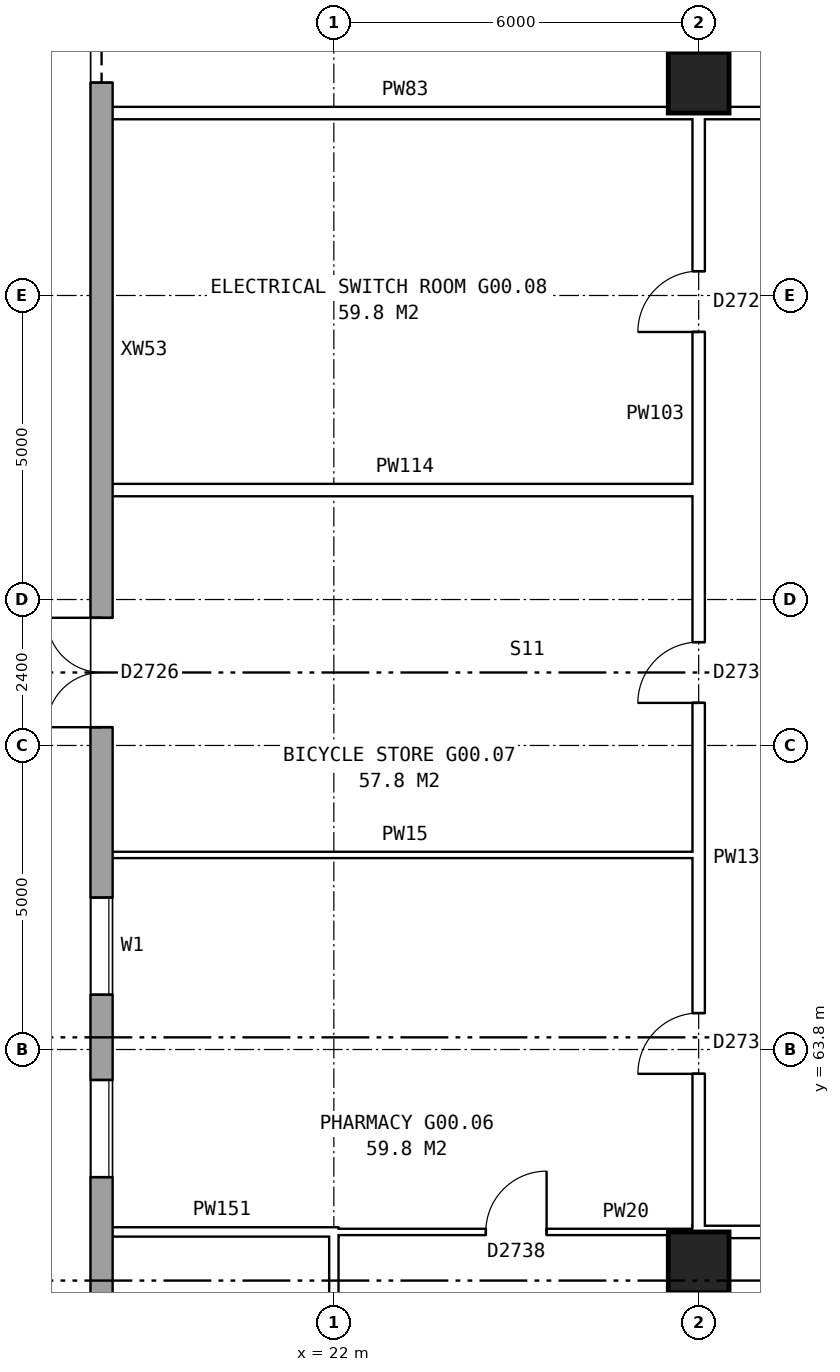
"""IFC4 building model, lengths in metres.
Left out: names, types, materials, properties, quantities, classifications, styles, units other than length and angle.
Written with IfcOpenShell. Run it as: python <this file> out.ifc"""

import sys

from ifc_helpers import new_model, si_unit, direction, frame, frame_2d, origin, origin_2d, place, context, subcontext, project, spatial, rectangle, extrude, element, fill, save


model = new_model("IFC4")
c1 = context("Model", 3, precision=1e-05, world=origin(), true_north=direction((0.0, 1.0)))
c2 = subcontext(c1, "Body", "Model", "MODEL_VIEW")
j1 = project(units=[si_unit("LENGTHUNIT", "METRE"), si_unit("PLANEANGLEUNIT", "RADIAN")], contexts=[c1])
p1 = place(None, origin())
s1 = spatial("IfcSite", under=j1, at=p1, CompositionType="ELEMENT")
p2 = place(p1, origin())
s2 = spatial("IfcBuilding", under=s1, at=p2, CompositionType="ELEMENT")
p3 = place(p2, origin())
s3 = spatial("IfcBuildingStorey", under=s2, at=p3, CompositionType="ELEMENT", Elevation=0.0)
for number, where, z_axis, x_axis in (
    (1, (28.0, 60.3, -0.35), (0.0, 0.0, 1.0), (1.0, 0.0, 0.0)),
    (2, (28.0, 79.7, -0.35), (0.0, 0.0, 1.0), (1.0, 0.0, 0.0)),
):
    element("IfcColumn", number, at=place(p3, frame(where, z_axis=z_axis, x_axis=x_axis)), inside=s3, PredefinedType="COLUMN", context=c2, shape_type="SweptSolid", body=[
        extrude(rectangle(XDim=1.0, YDim=1.0, at=origin_2d()), origin(), (0.0, 0.0, 1.0), 5.55),
    ])
p4 = place(p3, frame((18.18, 82.925, 0.0), z_axis=(0.0, 0.0, 1.0), x_axis=(0.0, -1.0, 0.0)))
e3 = element("IfcWall", 3, at=p4, inside=s3, PredefinedType="STANDARD", context=c2, shape_type="SweptSolid", body=[
    extrude(rectangle(XDim=25.851, YDim=0.36, at=frame_2d((12.925, 0.0))), origin(), (0.0, 0.0, 1.0), 5.2),
])
p5 = place(p4, frame((16.625, 0.0, 0.8)))
e4 = element("IfcOpeningElement", 4, at=p5, cuts=e3, PredefinedType="OPENING", context=c2, shape_type="SweptSolid", body=[
    extrude(rectangle(XDim=1.6, YDim=1.8, at=frame_2d((0.8, 0.9))), frame((0.0, 0.19, 0.0), z_axis=(0.0, -1.0, 0.0), x_axis=(1.0, 0.0, 0.0)), (0.0, 0.0, 1.0), 0.38),
])
p6 = place(p4, frame((19.625, 0.0, 0.8)))
e5 = element("IfcOpeningElement", 5, at=p6, cuts=e3, PredefinedType="OPENING", context=c2, shape_type="SweptSolid", body=[
    extrude(rectangle(XDim=1.6, YDim=1.8, at=frame_2d((0.8, 0.9))), frame((0.0, 0.19, 0.0), z_axis=(0.0, -1.0, 0.0), x_axis=(1.0, 0.0, 0.0)), (0.0, 0.0, 1.0), 0.38),
])
p7 = place(p4, frame((0.225, 0.0, 0.0)))
e6 = element("IfcOpeningElement", 6, at=p7, cuts=e3, PredefinedType="OPENING", context=c2, shape_type="SweptSolid", body=[
    extrude(rectangle(XDim=3.0, YDim=4.4, at=frame_2d((1.5, 2.2))), frame((0.0, 0.19, 0.0), z_axis=(0.0, -1.0, 0.0), x_axis=(1.0, 0.0, 0.0)), (0.0, 0.0, 1.0), 0.38),
])
p8 = place(p4, frame((12.025, 0.0, 0.0)))
e7 = element("IfcOpeningElement", 7, at=p8, cuts=e3, PredefinedType="OPENING", context=c2, shape_type="SweptSolid", body=[
    extrude(rectangle(XDim=1.8, YDim=2.4, at=frame_2d((0.9, 1.2))), frame((0.0, 0.19, 0.0), z_axis=(0.0, -1.0, 0.0), x_axis=(1.0, 0.0, 0.0)), (0.0, 0.0, 1.0), 0.38),
])
p9 = place(p3, frame((27.898, 60.8, 0.0), z_axis=(0.0, 0.0, 1.0), x_axis=(1.0, 0.0, 0.0)))
e8 = element("IfcWall", 8, at=p9, inside=s3, PredefinedType="PARTITIONING", context=c2, shape_type="SweptSolid", body=[
    extrude(rectangle(XDim=16.122, YDim=0.2, at=frame_2d((8.061, 0.0))), origin(), (0.0, 0.0, 1.0), 5.2),
])
p10 = place(p9, frame((2.201, 0.0, 0.0)))
e9 = element("IfcOpeningElement", 9, at=p10, cuts=e8, PredefinedType="OPENING", context=c2, shape_type="SweptSolid", body=[
    extrude(rectangle(XDim=1.8, YDim=2.1, at=frame_2d((0.9, 1.05))), frame((0.0, 0.11, 0.0), z_axis=(0.0, -1.0, 0.0), x_axis=(1.0, 0.0, 0.0)), (0.0, 0.0, 1.0), 0.22),
])
p11 = place(p3, frame((21.923, 60.8, 0.0), z_axis=(0.0, 0.0, 1.0), x_axis=(1.0, 0.0, 0.0)))
e10 = element("IfcWall", 10, at=p11, inside=s3, PredefinedType="PARTITIONING", context=c2, shape_type="SweptSolid", body=[
    extrude(rectangle(XDim=6.177, YDim=0.1, at=frame_2d((3.088, 0.0))), origin(), (0.0, 0.0, 1.0), 5.2),
])
p12 = place(p11, frame((2.576, 0.0, 0.0)))
e11 = element("IfcOpeningElement", 11, at=p12, cuts=e10, PredefinedType="OPENING", context=c2, shape_type="SweptSolid", body=[
    extrude(rectangle(XDim=1.0, YDim=2.1, at=frame_2d((0.5, 1.05))), frame((0.0, 0.06, 0.0), z_axis=(0.0, -1.0, 0.0), x_axis=(1.0, 0.0, 0.0)), (0.0, 0.0, 1.0), 0.12),
])
p13 = place(p3, frame((18.24, 60.8, 0.0), z_axis=(0.0, 0.0, 1.0), x_axis=(1.0, 0.0, 0.0)))
e12 = element("IfcWall", 12, at=p13, inside=s3, PredefinedType="PLUMBINGWALL", context=c2, shape_type="SweptSolid", body=[
    extrude(rectangle(XDim=3.837, YDim=0.15, at=frame_2d((1.918, 0.0))), origin(), (0.0, 0.0, 1.0), 5.2),
])
p14 = place(p3, frame((18.24, 67.0, 0.0), z_axis=(0.0, 0.0, 1.0), x_axis=(1.0, 0.0, 0.0)))
e13 = element("IfcWall", 13, at=p14, inside=s3, PredefinedType="PARTITIONING", context=c2, shape_type="SweptSolid", body=[
    extrude(rectangle(XDim=9.86, YDim=0.1, at=frame_2d((4.93, 0.0))), origin(), (0.0, 0.0, 1.0), 5.2),
])
p15 = place(p3, frame((18.24, 73.0, 0.0), z_axis=(0.0, 0.0, 1.0), x_axis=(1.0, 0.0, 0.0)))
e14 = element("IfcWall", 14, at=p15, inside=s3, PredefinedType="PARTITIONING", context=c2, shape_type="SweptSolid", body=[
    extrude(rectangle(XDim=9.86, YDim=0.2, at=frame_2d((4.93, 0.0))), origin(), (0.0, 0.0, 1.0), 5.2),
])
p16 = place(p3, frame((18.24, 79.2, 0.0), z_axis=(0.0, 0.0, 1.0), x_axis=(1.0, 0.0, 0.0)))
e15 = element("IfcWall", 15, at=p16, inside=s3, PredefinedType="PARTITIONING", context=c2, shape_type="SweptSolid", body=[
    extrude(rectangle(XDim=9.862, YDim=0.2, at=frame_2d((4.931, 0.0))), origin(), (0.0, 0.0, 1.0), 5.2),
])
p17 = place(p3, frame((27.898, 79.2, 0.0), z_axis=(0.0, 0.0, 1.0), x_axis=(1.0, 0.0, 0.0)))
e16 = element("IfcWall", 16, at=p17, inside=s3, PredefinedType="PARTITIONING", context=c2, shape_type="SweptSolid", body=[
    extrude(rectangle(XDim=16.122, YDim=0.2, at=frame_2d((8.061, 0.0))), origin(), (0.0, 0.0, 1.0), 5.2),
])
p18 = place(p17, frame((3.701, 0.0, 0.0)))
e17 = element("IfcOpeningElement", 17, at=p18, cuts=e16, PredefinedType="OPENING", context=c2, shape_type="SweptSolid", body=[
    extrude(rectangle(XDim=1.8, YDim=2.1, at=frame_2d((0.9, 1.05))), frame((0.0, 0.11, 0.0), z_axis=(0.0, -1.0, 0.0), x_axis=(1.0, 0.0, 0.0)), (0.0, 0.0, 1.0), 0.22),
])
p19 = place(p17, frame((10.102, 0.0, 0.0)))
e18 = element("IfcOpeningElement", 18, at=p19, cuts=e16, PredefinedType="OPENING", context=c2, shape_type="SweptSolid", body=[
    extrude(rectangle(XDim=1.0, YDim=2.1, at=frame_2d((0.5, 1.05))), frame((0.0, 0.11, 0.0), z_axis=(0.0, -1.0, 0.0), x_axis=(1.0, 0.0, 0.0)), (0.0, 0.0, 1.0), 0.22),
])
p20 = place(p17, frame((13.552, 0.0, 0.0)))
e19 = element("IfcOpeningElement", 19, at=p20, cuts=e16, PredefinedType="OPENING", context=c2, shape_type="SweptSolid", body=[
    extrude(rectangle(XDim=1.0, YDim=2.1, at=frame_2d((0.5, 1.05))), frame((0.0, 0.11, 0.0), z_axis=(0.0, -1.0, 0.0), x_axis=(1.0, 0.0, 0.0)), (0.0, 0.0, 1.0), 0.22),
])
p21 = place(p3, frame((22.0, 54.24, 0.0), z_axis=(0.0, 0.0, 1.0), x_axis=(0.0, 1.0, 0.0)))
e20 = element("IfcWall", 20, at=p21, inside=s3, PredefinedType="PLUMBINGWALL", context=c2, shape_type="SweptSolid", body=[
    extrude(rectangle(XDim=6.635, YDim=0.15, at=frame_2d((3.317, 0.0))), origin(), (0.0, 0.0, 1.0), 5.2),
])
p22 = place(p21, frame((2.84, 0.0, 0.0)))
e21 = element("IfcOpeningElement", 21, at=p22, cuts=e20, PredefinedType="OPENING", context=c2, shape_type="SweptSolid", body=[
    extrude(rectangle(XDim=1.0, YDim=2.1, at=frame_2d((0.5, 1.05))), frame((0.0, 0.085, 0.0), z_axis=(0.0, -1.0, 0.0), x_axis=(1.0, 0.0, 0.0)), (0.0, 0.0, 1.0), 0.17),
])
p23 = place(p3, frame((28.0, 72.9, 0.0), z_axis=(0.0, 0.0, 1.0), x_axis=(0.0, 1.0, 0.0)))
e22 = element("IfcWall", 22, at=p23, inside=s3, PredefinedType="PARTITIONING", context=c2, shape_type="SweptSolid", body=[
    extrude(rectangle(XDim=6.4, YDim=0.2, at=frame_2d((3.2, 0.0))), origin(), (0.0, 0.0, 1.0), 5.2),
])
p24 = place(p23, frame((2.7, 0.0, 0.0)))
e23 = element("IfcOpeningElement", 23, at=p24, cuts=e22, PredefinedType="OPENING", context=c2, shape_type="SweptSolid", body=[
    extrude(rectangle(XDim=1.0, YDim=2.1, at=frame_2d((0.5, 1.05))), frame((0.0, 0.11, 0.0), z_axis=(0.0, -1.0, 0.0), x_axis=(1.0, 0.0, 0.0)), (0.0, 0.0, 1.0), 0.22),
])
p25 = place(p3, frame((28.0, 60.7, 0.0), z_axis=(0.0, 0.0, 1.0), x_axis=(0.0, 1.0, 0.0)))
e24 = element("IfcWall", 24, at=p25, inside=s3, PredefinedType="PARTITIONING", context=c2, shape_type="SweptSolid", body=[
    extrude(rectangle(XDim=12.4, YDim=0.2, at=frame_2d((6.2, 0.0))), origin(), (0.0, 0.0, 1.0), 5.2),
])
p26 = place(p25, frame((2.7, 0.0, 0.0)))
e25 = element("IfcOpeningElement", 25, at=p26, cuts=e24, PredefinedType="OPENING", context=c2, shape_type="SweptSolid", body=[
    extrude(rectangle(XDim=1.0, YDim=2.1, at=frame_2d((0.5, 1.05))), frame((0.0, 0.11, 0.0), z_axis=(0.0, -1.0, 0.0), x_axis=(1.0, 0.0, 0.0)), (0.0, 0.0, 1.0), 0.22),
])
p27 = place(p25, frame((8.8, 0.0, 0.0)))
e26 = element("IfcOpeningElement", 26, at=p27, cuts=e24, PredefinedType="OPENING", context=c2, shape_type="SweptSolid", body=[
    extrude(rectangle(XDim=1.0, YDim=2.1, at=frame_2d((0.5, 1.05))), frame((0.0, 0.11, 0.0), z_axis=(0.0, -1.0, 0.0), x_axis=(1.0, 0.0, 0.0)), (0.0, 0.0, 1.0), 0.22),
])
p28 = place(p5, origin())
e27 = element("IfcWindow", 27, at=p28, inside=s3, PartitioningType="SINGLE_PANEL", PredefinedType="WINDOW", context=c2, shape_type="SweptSolid", body=[
    extrude(rectangle(XDim=1.6, YDim=1.8, at=frame_2d((0.8, 0.9))), frame((0.0, 0.15, 0.0), z_axis=(0.0, -1.0, 0.0), x_axis=(1.0, 0.0, 0.0)), (0.0, 0.0, 1.0), 0.06),
])
fill(e4, e27)
p29 = place(p6, origin())
e28 = element("IfcWindow", 28, at=p29, inside=s3, PartitioningType="SINGLE_PANEL", PredefinedType="WINDOW", context=c2, shape_type="SweptSolid", body=[
    extrude(rectangle(XDim=1.6, YDim=1.8, at=frame_2d((0.8, 0.9))), frame((0.0, 0.15, 0.0), z_axis=(0.0, -1.0, 0.0), x_axis=(1.0, 0.0, 0.0)), (0.0, 0.0, 1.0), 0.06),
])
fill(e5, e28)
p30 = place(p7, frame((3.0, 0.0, 0.0), z_axis=(0.0, 0.0, 1.0), x_axis=(-1.0, 0.0, 0.0)))
e29 = element("IfcDoor", 29, at=p30, inside=s3, OperationType="ROLLINGUP", PredefinedType="GATE", context=c2, shape_type="SweptSolid", body=[
    extrude(rectangle(XDim=3.0, YDim=4.4, at=frame_2d((1.5, 2.2))), frame((0.0, 0.025, 0.0), z_axis=(0.0, -1.0, 0.0), x_axis=(1.0, 0.0, 0.0)), (0.0, 0.0, 1.0), 0.05),
])
fill(e6, e29)
p31 = place(p8, frame((1.8, 0.0, 0.0), z_axis=(0.0, 0.0, 1.0), x_axis=(-1.0, 0.0, 0.0)))
e30 = element("IfcDoor", 30, at=p31, inside=s3, OperationType="DOUBLE_DOOR_SINGLE_SWING", PredefinedType="DOOR", context=c2, shape_type="SweptSolid", body=[
    extrude(rectangle(XDim=1.8, YDim=2.4, at=frame_2d((0.9, 1.2))), frame((0.0, 0.025, 0.0), z_axis=(0.0, -1.0, 0.0), x_axis=(1.0, 0.0, 0.0)), (0.0, 0.0, 1.0), 0.05),
])
fill(e7, e30)
p32 = place(p12, origin())
e31 = element("IfcDoor", 31, at=p32, inside=s3, OperationType="SINGLE_SWING_RIGHT", PredefinedType="DOOR", context=c2, shape_type="SweptSolid", body=[
    extrude(rectangle(XDim=1.0, YDim=2.1, at=frame_2d((0.5, 1.05))), frame((0.0, 0.025, 0.0), z_axis=(0.0, -1.0, 0.0), x_axis=(1.0, 0.0, 0.0)), (0.0, 0.0, 1.0), 0.05),
])
fill(e11, e31)
p33 = place(p24, origin())
e32 = element("IfcDoor", 32, at=p33, inside=s3, OperationType="SINGLE_SWING_LEFT", PredefinedType="DOOR", context=c2, shape_type="SweptSolid", body=[
    extrude(rectangle(XDim=1.0, YDim=2.1, at=frame_2d((0.5, 1.05))), frame((0.0, 0.025, 0.0), z_axis=(0.0, -1.0, 0.0), x_axis=(1.0, 0.0, 0.0)), (0.0, 0.0, 1.0), 0.05),
])
fill(e23, e32)
p34 = place(p26, origin())
e33 = element("IfcDoor", 33, at=p34, inside=s3, OperationType="SINGLE_SWING_LEFT", PredefinedType="DOOR", context=c2, shape_type="SweptSolid", body=[
    extrude(rectangle(XDim=1.0, YDim=2.1, at=frame_2d((0.5, 1.05))), frame((0.0, 0.025, 0.0), z_axis=(0.0, -1.0, 0.0), x_axis=(1.0, 0.0, 0.0)), (0.0, 0.0, 1.0), 0.05),
])
fill(e25, e33)
p35 = place(p27, origin())
e34 = element("IfcDoor", 34, at=p35, inside=s3, OperationType="SINGLE_SWING_LEFT", PredefinedType="DOOR", context=c2, shape_type="SweptSolid", body=[
    extrude(rectangle(XDim=1.0, YDim=2.1, at=frame_2d((0.5, 1.05))), frame((0.0, 0.025, 0.0), z_axis=(0.0, -1.0, 0.0), x_axis=(1.0, 0.0, 0.0)), (0.0, 0.0, 1.0), 0.05),
])
fill(e26, e34)
save(model, sys.argv[1])
